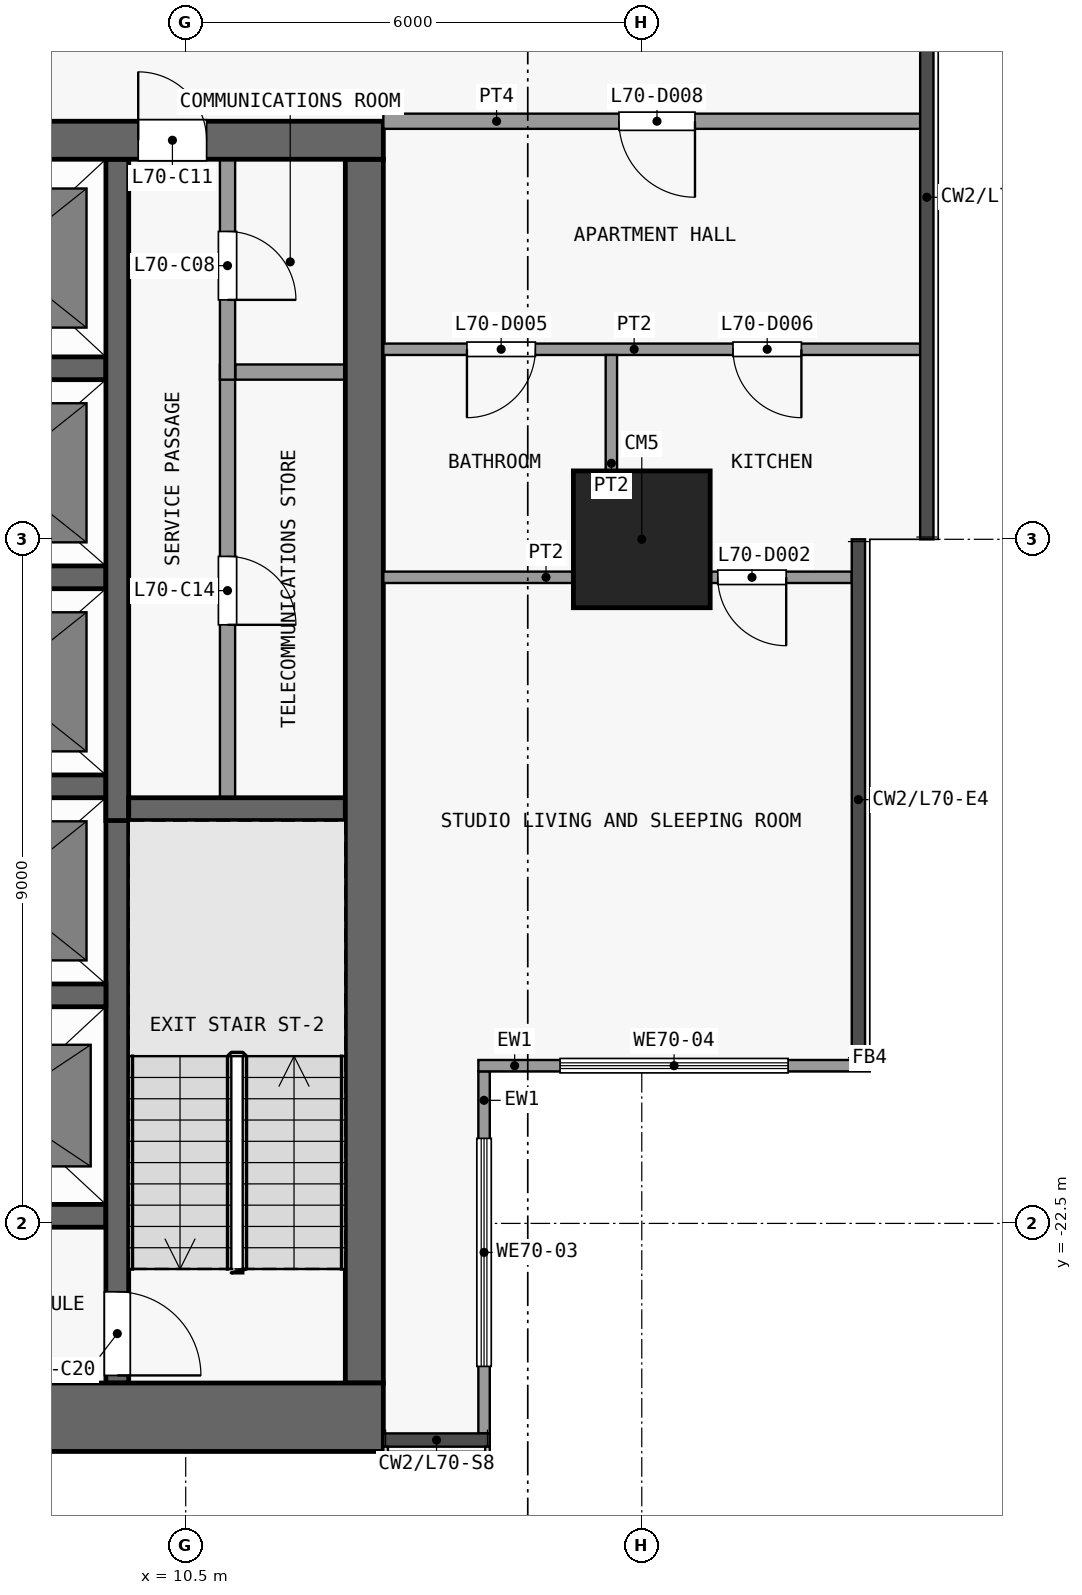
"""IFC4 building model, lengths in metres.
Left out: names, types, materials, properties, quantities, classifications, styles, units other than length and angle.
Written with IfcOpenShell. Run it as: python <this file> out.ifc"""

import sys

from ifc_helpers import new_model, si_unit, direction, frame, frame_2d, origin, origin_2d, place, context, subcontext, project, spatial, rectangle, extrude, element, fill, save


model = new_model("IFC4")
c1 = context("Model", 3, precision=1e-05, world=origin(), true_north=direction((0.0, 1.0)))
c2 = subcontext(c1, "Body", "Model", "MODEL_VIEW")
j1 = project(units=[si_unit("LENGTHUNIT", "METRE"), si_unit("PLANEANGLEUNIT", "RADIAN")], contexts=[c1])
p1 = place(None, origin())
s1 = spatial("IfcSite", under=j1, at=p1, CompositionType="ELEMENT")
p2 = place(p1, origin())
s2 = spatial("IfcBuilding", under=s1, at=p2, CompositionType="ELEMENT")
p3 = place(p2, frame((0.0, 0.0, 277.1)))
s3 = spatial("IfcBuildingStorey", under=s2, at=p3, CompositionType="ELEMENT", Elevation=277.1)
p4 = place(p3, frame((16.5, -13.5, 0.0), z_axis=(0.0, 0.0, 1.0), x_axis=(1.0, 0.0, 0.0)))
e1 = element("IfcColumn", 1, at=p4, inside=s3, PredefinedType="COLUMN", context=c2, shape_type="SweptSolid", body=[
    extrude(rectangle(XDim=1.8, YDim=1.8, at=origin_2d()), origin(), (0.0, 0.0, 1.0), 3.6),
])
p5 = place(p3, frame((-13.1, -25.05, 0.0), z_axis=(0.0, 0.0, 1.0), x_axis=(1.0, 0.0, 0.0)))
e2 = element("IfcWall", 2, at=p5, inside=s3, PredefinedType="SHEAR", context=c2, shape_type="SweptSolid", body=[
    extrude(rectangle(XDim=26.2, YDim=0.9, at=frame_2d((13.1, 0.0))), origin(), (0.0, 0.0, 1.0), 3.3),
])
p6 = place(p3, frame((-13.1, -8.25, 0.0), z_axis=(0.0, 0.0, 1.0), x_axis=(1.0, 0.0, 0.0)))
e3 = element("IfcWall", 3, at=p6, inside=s3, PredefinedType="SHEAR", context=c2, shape_type="SweptSolid", body=[
    extrude(rectangle(XDim=26.2, YDim=0.5, at=frame_2d((13.1, 0.0))), origin(), (0.0, 0.0, 1.0), 3.3),
])
p7 = place(p6, frame((7.4, 0.0, 0.0)))
e4 = element("IfcOpeningElement", 4, at=p7, cuts=e3, PredefinedType="OPENING", context=c2, shape_type="SweptSolid", body=[
    extrude(rectangle(XDim=1.8, YDim=2.1, at=frame_2d((0.9, 1.05))), frame((0.0, 0.26, 0.0), z_axis=(0.0, -1.0, 0.0), x_axis=(1.0, 0.0, 0.0)), (0.0, 0.0, 1.0), 0.52),
])
p8 = place(p6, frame((17.0, 0.0, 0.0)))
e5 = element("IfcOpeningElement", 5, at=p8, cuts=e3, PredefinedType="OPENING", context=c2, shape_type="SweptSolid", body=[
    extrude(rectangle(XDim=1.8, YDim=2.1, at=frame_2d((0.9, 1.05))), frame((0.0, 0.26, 0.0), z_axis=(0.0, -1.0, 0.0), x_axis=(1.0, 0.0, 0.0)), (0.0, 0.0, 1.0), 0.52),
])
p9 = place(p6, frame((2.325, 0.0, 0.0)))
e6 = element("IfcOpeningElement", 6, at=p9, cuts=e3, PredefinedType="OPENING", context=c2, shape_type="SweptSolid", body=[
    extrude(rectangle(XDim=0.9, YDim=2.1, at=frame_2d((0.45, 1.05))), frame((0.0, 0.26, 0.0), z_axis=(0.0, -1.0, 0.0), x_axis=(1.0, 0.0, 0.0)), (0.0, 0.0, 1.0), 0.52),
])
p10 = place(p6, frame((22.975, 0.0, 0.0)))
e7 = element("IfcOpeningElement", 7, at=p10, cuts=e3, PredefinedType="OPENING", context=c2, shape_type="SweptSolid", body=[
    extrude(rectangle(XDim=0.9, YDim=2.1, at=frame_2d((0.45, 1.05))), frame((0.0, 0.26, 0.0), z_axis=(0.0, -1.0, 0.0), x_axis=(1.0, 0.0, 0.0)), (0.0, 0.0, 1.0), 0.52),
])
p11 = place(p3, frame((12.85, -24.6, 0.0), z_axis=(0.0, 0.0, 1.0), x_axis=(0.0, 1.0, 0.0)))
e8 = element("IfcWall", 8, at=p11, inside=s3, PredefinedType="SHEAR", context=c2, shape_type="SweptSolid", body=[
    extrude(rectangle(XDim=16.1, YDim=0.5, at=frame_2d((8.05, 0.0))), origin(), (0.0, 0.0, 1.0), 3.3),
])
for number, where, z_axis, x_axis in (
    (9, (6.65, -22.4, 0.0), (0.0, 0.0, 1.0), (1.0, 0.0, 0.0)),
    (10, (6.65, -19.5, 0.0), (0.0, 0.0, 1.0), (1.0, 0.0, 0.0)),
):
    element("IfcWall", number, at=place(p3, frame(where, z_axis=z_axis, x_axis=x_axis)), inside=s3, PredefinedType="SHEAR", context=c2, shape_type="SweptSolid", body=[
        extrude(rectangle(XDim=2.8, YDim=0.3, at=frame_2d((1.4, 0.0))), origin(), (0.0, 0.0, 1.0), 3.3),
    ])
p12 = place(p3, frame((9.75, -17.05, 0.0), z_axis=(0.0, 0.0, 1.0), x_axis=(1.0, 0.0, 0.0)))
e11 = element("IfcWall", 11, at=p12, inside=s3, PredefinedType="SHEAR", context=c2, shape_type="SweptSolid", body=[
    extrude(rectangle(XDim=2.85, YDim=0.3, at=frame_2d((1.425, 0.0))), origin(), (0.0, 0.0, 1.0), 3.3),
])
for number, where, z_axis, x_axis in (
    (12, (6.65, -16.75, 0.0), (0.0, 0.0, 1.0), (1.0, 0.0, 0.0)),
    (13, (6.65, -14.0, 0.0), (0.0, 0.0, 1.0), (1.0, 0.0, 0.0)),
):
    element("IfcWall", number, at=place(p3, frame(where, z_axis=z_axis, x_axis=x_axis)), inside=s3, PredefinedType="SHEAR", context=c2, shape_type="SweptSolid", body=[
        extrude(rectangle(XDim=2.8, YDim=0.3, at=frame_2d((1.4, 0.0))), origin(), (0.0, 0.0, 1.0), 3.3),
    ])
p13 = place(p3, frame((11.15, -11.3, 0.0), z_axis=(0.0, 0.0, 1.0), x_axis=(1.0, 0.0, 0.0)))
e14 = element("IfcWall", 14, at=p13, inside=s3, PredefinedType="PARTITIONING", context=c2, shape_type="SweptSolid", body=[
    extrude(rectangle(XDim=1.45, YDim=0.2, at=frame_2d((0.725, 0.0))), origin(), (0.0, 0.0, 1.0), 3.3),
])
p14 = place(p3, frame((6.65, -11.25, 0.0), z_axis=(0.0, 0.0, 1.0), x_axis=(1.0, 0.0, 0.0)))
e15 = element("IfcWall", 15, at=p14, inside=s3, PredefinedType="SHEAR", context=c2, shape_type="SweptSolid", body=[
    extrude(rectangle(XDim=2.8, YDim=0.3, at=frame_2d((1.4, 0.0))), origin(), (0.0, 0.0, 1.0), 3.3),
])
p15 = place(p3, frame((9.6, -16.9, 0.0), z_axis=(0.0, 0.0, 1.0), x_axis=(0.0, -1.0, 0.0)))
e16 = element("IfcWall", 16, at=p15, inside=s3, PredefinedType="SHEAR", context=c2, shape_type="SweptSolid", body=[
    extrude(rectangle(XDim=7.7, YDim=0.3, at=frame_2d((3.85, 0.0))), origin(), (0.0, 0.0, 1.0), 3.3),
])
p16 = place(p15, frame((6.5, 0.0, 0.0)))
e17 = element("IfcOpeningElement", 17, at=p16, cuts=e16, PredefinedType="OPENING", context=c2, shape_type="SweptSolid", body=[
    extrude(rectangle(XDim=1.1, YDim=2.1, at=frame_2d((0.55, 1.05))), frame((0.0, 0.16, 0.0), z_axis=(0.0, -1.0, 0.0), x_axis=(1.0, 0.0, 0.0)), (0.0, 0.0, 1.0), 0.32),
])
p17 = place(p3, frame((9.6, -17.2, 0.0), z_axis=(0.0, 0.0, 1.0), x_axis=(0.0, 1.0, 0.0)))
e18 = element("IfcWall", 18, at=p17, inside=s3, PredefinedType="SHEAR", context=c2, shape_type="SweptSolid", body=[
    extrude(rectangle(XDim=8.7, YDim=0.3, at=frame_2d((4.35, 0.0))), origin(), (0.0, 0.0, 1.0), 3.3),
])
p18 = place(p3, frame((11.05, -11.2, 0.0), z_axis=(0.0, 0.0, 1.0), x_axis=(0.0, -1.0, 0.0)))
e19 = element("IfcWall", 19, at=p18, inside=s3, PredefinedType="PARTITIONING", context=c2, shape_type="SweptSolid", body=[
    extrude(rectangle(XDim=5.7, YDim=0.2, at=frame_2d((2.85, 0.0))), origin(), (0.0, 0.0, 1.0), 3.3),
])
p19 = place(p18, frame((2.525, 0.0, 0.0)))
e20 = element("IfcOpeningElement", 20, at=p19, cuts=e19, PredefinedType="OPENING", context=c2, shape_type="SweptSolid", body=[
    extrude(rectangle(XDim=0.9, YDim=2.1, at=frame_2d((0.45, 1.05))), frame((0.0, 0.11, 0.0), z_axis=(0.0, -1.0, 0.0), x_axis=(1.0, 0.0, 0.0)), (0.0, 0.0, 1.0), 0.22),
])
p20 = place(p3, frame((11.05, -8.5, 0.0), z_axis=(0.0, 0.0, 1.0), x_axis=(0.0, -1.0, 0.0)))
e21 = element("IfcWall", 21, at=p20, inside=s3, PredefinedType="PARTITIONING", context=c2, shape_type="SweptSolid", body=[
    extrude(rectangle(XDim=2.9, YDim=0.2, at=frame_2d((1.45, 0.0))), origin(), (0.0, 0.0, 1.0), 3.3),
])
p21 = place(p20, frame((0.95, 0.0, 0.0)))
e22 = element("IfcOpeningElement", 22, at=p21, cuts=e21, PredefinedType="OPENING", context=c2, shape_type="SweptSolid", body=[
    extrude(rectangle(XDim=0.9, YDim=2.1, at=frame_2d((0.45, 1.05))), frame((0.0, 0.11, 0.0), z_axis=(0.0, -1.0, 0.0), x_axis=(1.0, 0.0, 0.0)), (0.0, 0.0, 1.0), 0.22),
])
p22 = place(p3, frame((14.425, -20.5, 0.0), z_axis=(0.0, 0.0, 1.0), x_axis=(0.0, -1.0, 0.0)))
e23 = element("IfcWall", 23, at=p22, inside=s3, PredefinedType="SOLIDWALL", context=c2, shape_type="SweptSolid", body=[
    extrude(rectangle(XDim=4.762, YDim=0.15, at=frame_2d((2.381, 0.0))), origin(), (0.0, 0.0, 1.0), 3.3),
])
p23 = place(p22, frame((0.881, 0.0, 0.9)))
e24 = element("IfcOpeningElement", 24, at=p23, cuts=e23, PredefinedType="OPENING", context=c2, shape_type="SweptSolid", body=[
    extrude(rectangle(XDim=3.0, YDim=2.4, at=frame_2d((1.5, 1.2))), frame((0.0, 0.085, 0.0), z_axis=(0.0, -1.0, 0.0), x_axis=(1.0, 0.0, 0.0)), (0.0, 0.0, 1.0), 0.17),
])
p24 = place(p3, frame((19.5, -20.425, 0.0), z_axis=(0.0, 0.0, 1.0), x_axis=(-1.0, 0.0, 0.0)))
e25 = element("IfcWall", 25, at=p24, inside=s3, PredefinedType="SOLIDWALL", context=c2, shape_type="SweptSolid", body=[
    extrude(rectangle(XDim=5.15, YDim=0.15, at=frame_2d((2.575, 0.0))), origin(), (0.0, 0.0, 1.0), 3.3),
])
p25 = place(p24, frame((1.075, 0.0, 0.9)))
e26 = element("IfcOpeningElement", 26, at=p25, cuts=e25, PredefinedType="OPENING", context=c2, shape_type="SweptSolid", body=[
    extrude(rectangle(XDim=3.0, YDim=2.4, at=frame_2d((1.5, 1.2))), frame((0.0, 0.085, 0.0), z_axis=(0.0, -1.0, 0.0), x_axis=(1.0, 0.0, 0.0)), (0.0, 0.0, 1.0), 0.17),
])
p26 = place(p3, frame((13.1, -14.0, 0.0), z_axis=(0.0, 0.0, 1.0), x_axis=(1.0, 0.0, 0.0)))
e27 = element("IfcWall", 27, at=p26, inside=s3, PredefinedType="PARTITIONING", context=c2, shape_type="SweptSolid", body=[
    extrude(rectangle(XDim=6.162, YDim=0.15, at=frame_2d((3.081, 0.0))), origin(), (0.0, 0.0, 1.0), 3.3),
])
p27 = place(p26, frame((4.4, 0.0, 0.0)))
e28 = element("IfcOpeningElement", 28, at=p27, cuts=e27, PredefinedType="OPENING", context=c2, shape_type="SweptSolid", body=[
    extrude(rectangle(XDim=0.9, YDim=2.1, at=frame_2d((0.45, 1.05))), frame((0.0, 0.085, 0.0), z_axis=(0.0, -1.0, 0.0), x_axis=(1.0, 0.0, 0.0)), (0.0, 0.0, 1.0), 0.17),
])
p28 = place(p3, frame((13.1, -11.0, 0.0), z_axis=(0.0, 0.0, 1.0), x_axis=(1.0, 0.0, 0.0)))
e29 = element("IfcWall", 29, at=p28, inside=s3, PredefinedType="PARTITIONING", context=c2, shape_type="SweptSolid", body=[
    extrude(rectangle(XDim=7.062, YDim=0.15, at=frame_2d((3.531, 0.0))), origin(), (0.0, 0.0, 1.0), 3.3),
])
p29 = place(p28, frame((1.1, 0.0, 0.0)))
e30 = element("IfcOpeningElement", 30, at=p29, cuts=e29, PredefinedType="OPENING", context=c2, shape_type="SweptSolid", body=[
    extrude(rectangle(XDim=0.9, YDim=2.1, at=frame_2d((0.45, 1.05))), frame((0.0, 0.085, 0.0), z_axis=(0.0, -1.0, 0.0), x_axis=(1.0, 0.0, 0.0)), (0.0, 0.0, 1.0), 0.17),
])
p30 = place(p28, frame((4.6, 0.0, 0.0)))
e31 = element("IfcOpeningElement", 31, at=p30, cuts=e29, PredefinedType="OPENING", context=c2, shape_type="SweptSolid", body=[
    extrude(rectangle(XDim=0.9, YDim=2.1, at=frame_2d((0.45, 1.05))), frame((0.0, 0.085, 0.0), z_axis=(0.0, -1.0, 0.0), x_axis=(1.0, 0.0, 0.0)), (0.0, 0.0, 1.0), 0.17),
])
p31 = place(p3, frame((13.1, -8.0, 0.0), z_axis=(0.0, 0.0, 1.0), x_axis=(1.0, 0.0, 0.0)))
e32 = element("IfcWall", 32, at=p31, inside=s3, PredefinedType="PARTITIONING", context=c2, shape_type="SweptSolid", body=[
    extrude(rectangle(XDim=7.062, YDim=0.2, at=frame_2d((3.531, 0.0))), origin(), (0.0, 0.0, 1.0), 3.3),
])
p32 = place(p31, frame((3.1, 0.0, 0.0)))
e33 = element("IfcOpeningElement", 33, at=p32, cuts=e32, PredefinedType="OPENING", context=c2, shape_type="SweptSolid", body=[
    extrude(rectangle(XDim=1.0, YDim=2.1, at=frame_2d((0.5, 1.05))), frame((0.0, 0.11, 0.0), z_axis=(0.0, -1.0, 0.0), x_axis=(1.0, 0.0, 0.0)), (0.0, 0.0, 1.0), 0.22),
])
p33 = place(p3, frame((16.1, -13.925, 0.0), z_axis=(0.0, 0.0, 1.0), x_axis=(0.0, 1.0, 0.0)))
e34 = element("IfcWall", 34, at=p33, inside=s3, PredefinedType="PARTITIONING", context=c2, shape_type="SweptSolid", body=[
    extrude(rectangle(XDim=2.85, YDim=0.15, at=frame_2d((1.425, 0.0))), origin(), (0.0, 0.0, 1.0), 3.3),
])
p34 = place(p21, origin())
e35 = element("IfcDoor", 35, at=p34, inside=s3, OperationType="SINGLE_SWING_RIGHT", PredefinedType="DOOR", context=c2, shape_type="SweptSolid", body=[
    extrude(rectangle(XDim=0.9, YDim=2.1, at=frame_2d((0.45, 1.05))), frame((0.0, 0.025, 0.0), z_axis=(0.0, -1.0, 0.0), x_axis=(1.0, 0.0, 0.0)), (0.0, 0.0, 1.0), 0.05),
])
fill(e22, e35)
p35 = place(p10, origin())
e36 = element("IfcDoor", 36, at=p35, inside=s3, OperationType="SINGLE_SWING_LEFT", PredefinedType="DOOR", context=c2, shape_type="SweptSolid", body=[
    extrude(rectangle(XDim=0.9, YDim=2.1, at=frame_2d((0.45, 1.05))), frame((0.0, 0.025, 0.0), z_axis=(0.0, -1.0, 0.0), x_axis=(1.0, 0.0, 0.0)), (0.0, 0.0, 1.0), 0.05),
])
fill(e7, e36)
p36 = place(p19, origin())
e37 = element("IfcDoor", 37, at=p36, inside=s3, OperationType="SINGLE_SWING_RIGHT", PredefinedType="DOOR", context=c2, shape_type="SweptSolid", body=[
    extrude(rectangle(XDim=0.9, YDim=2.1, at=frame_2d((0.45, 1.05))), frame((0.0, 0.025, 0.0), z_axis=(0.0, -1.0, 0.0), x_axis=(1.0, 0.0, 0.0)), (0.0, 0.0, 1.0), 0.05),
])
fill(e20, e37)
p37 = place(p16, origin())
e38 = element("IfcDoor", 38, at=p37, inside=s3, OperationType="SINGLE_SWING_RIGHT", PredefinedType="DOOR", context=c2, shape_type="SweptSolid", body=[
    extrude(rectangle(XDim=1.1, YDim=2.1, at=frame_2d((0.55, 1.05))), frame((0.0, 0.025, 0.0), z_axis=(0.0, -1.0, 0.0), x_axis=(1.0, 0.0, 0.0)), (0.0, 0.0, 1.0), 0.05),
])
fill(e17, e38)
p38 = place(p23, origin())
e39 = element("IfcWindow", 39, at=p38, inside=s3, PartitioningType="SINGLE_PANEL", PredefinedType="WINDOW", context=c2, shape_type="SweptSolid", body=[
    extrude(rectangle(XDim=3.0, YDim=2.4, at=frame_2d((1.5, 1.2))), frame((0.0, 0.03, 0.0), z_axis=(0.0, -1.0, 0.0), x_axis=(1.0, 0.0, 0.0)), (0.0, 0.0, 1.0), 0.06),
])
fill(e24, e39)
p39 = place(p25, origin())
e40 = element("IfcWindow", 40, at=p39, inside=s3, PartitioningType="SINGLE_PANEL", PredefinedType="WINDOW", context=c2, shape_type="SweptSolid", body=[
    extrude(rectangle(XDim=3.0, YDim=2.4, at=frame_2d((1.5, 1.2))), frame((0.0, 0.03, 0.0), z_axis=(0.0, -1.0, 0.0), x_axis=(1.0, 0.0, 0.0)), (0.0, 0.0, 1.0), 0.06),
])
fill(e26, e40)
p40 = place(p27, origin())
e41 = element("IfcDoor", 41, at=p40, inside=s3, OperationType="SINGLE_SWING_RIGHT", PredefinedType="DOOR", context=c2, shape_type="SweptSolid", body=[
    extrude(rectangle(XDim=0.9, YDim=2.1, at=frame_2d((0.45, 1.05))), frame((0.0, 0.025, 0.0), z_axis=(0.0, -1.0, 0.0), x_axis=(1.0, 0.0, 0.0)), (0.0, 0.0, 1.0), 0.05),
])
fill(e28, e41)
p41 = place(p29, origin())
e42 = element("IfcDoor", 42, at=p41, inside=s3, OperationType="SINGLE_SWING_LEFT", PredefinedType="DOOR", context=c2, shape_type="SweptSolid", body=[
    extrude(rectangle(XDim=0.9, YDim=2.1, at=frame_2d((0.45, 1.05))), frame((0.0, 0.025, 0.0), z_axis=(0.0, -1.0, 0.0), x_axis=(1.0, 0.0, 0.0)), (0.0, 0.0, 1.0), 0.05),
])
fill(e30, e42)
p42 = place(p30, origin())
e43 = element("IfcDoor", 43, at=p42, inside=s3, OperationType="SINGLE_SWING_RIGHT", PredefinedType="DOOR", context=c2, shape_type="SweptSolid", body=[
    extrude(rectangle(XDim=0.9, YDim=2.1, at=frame_2d((0.45, 1.05))), frame((0.0, 0.025, 0.0), z_axis=(0.0, -1.0, 0.0), x_axis=(1.0, 0.0, 0.0)), (0.0, 0.0, 1.0), 0.05),
])
fill(e31, e43)
p43 = place(p32, origin())
e44 = element("IfcDoor", 44, at=p43, inside=s3, OperationType="SINGLE_SWING_RIGHT", PredefinedType="DOOR", context=c2, shape_type="SweptSolid", body=[
    extrude(rectangle(XDim=1.0, YDim=2.1, at=frame_2d((0.5, 1.05))), frame((0.0, 0.025, 0.0), z_axis=(0.0, -1.0, 0.0), x_axis=(1.0, 0.0, 0.0)), (0.0, 0.0, 1.0), 0.05),
])
fill(e33, e44)
save(model, sys.argv[1])
